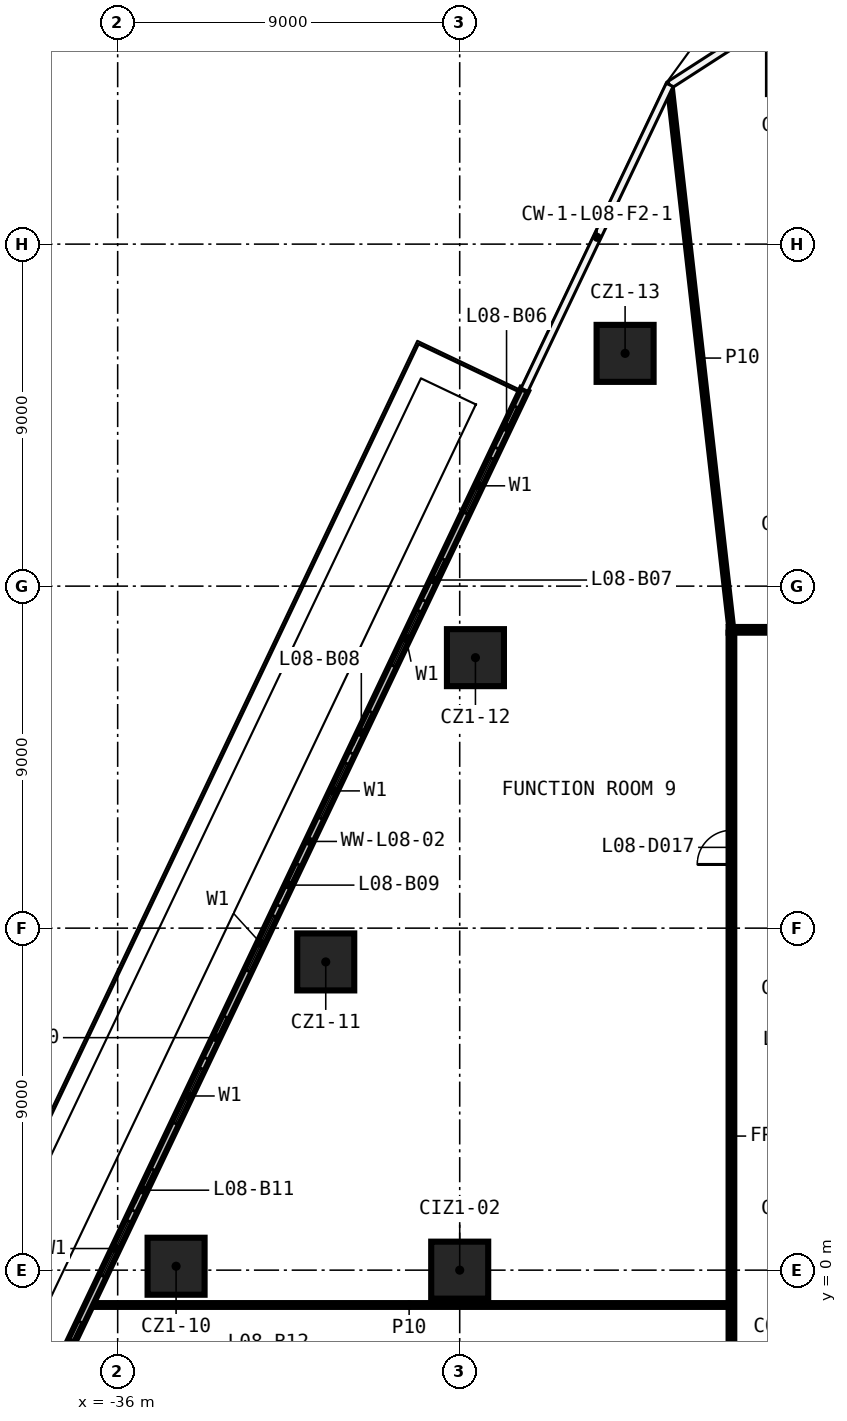
"""IFC4 building model, lengths in metres.
Left out: names, types, materials, properties, quantities, classifications, styles, units other than length and angle.
Written with IfcOpenShell. Run it as: python <this file> out.ifc"""

import sys

from ifc_helpers import new_model, si_unit, direction, frame, frame_2d, origin, origin_2d, place, context, subcontext, project, spatial, rectangle, extrude, element, fill, save


model = new_model("IFC4")
c1 = context("Model", 3, precision=1e-05, world=origin(), true_north=direction((0.0, 1.0)))
c2 = subcontext(c1, "Body", "Model", "MODEL_VIEW")
j1 = project(units=[si_unit("LENGTHUNIT", "METRE"), si_unit("PLANEANGLEUNIT", "RADIAN")], contexts=[c1])
p1 = place(None, origin())
s1 = spatial("IfcSite", under=j1, at=p1, CompositionType="ELEMENT")
p2 = place(p1, origin())
s2 = spatial("IfcBuilding", under=s1, at=p2, CompositionType="ELEMENT")
p3 = place(p2, frame((0.0, 0.0, 51.4)))
s3 = spatial("IfcBuildingStorey", under=s2, at=p3, CompositionType="ELEMENT", Elevation=51.4)
for number, where, z_axis, x_axis in (
    (1, (-34.463, 0.103, 0.0), (0.0, 0.0, 1.0), (1.0, 0.0, 0.0)),
    (2, (-30.525, 8.111, 0.0), (0.0, 0.0, 1.0), (1.0, 0.0, 0.0)),
    (3, (-26.586, 16.118, 0.0), (0.0, 0.0, 1.0), (1.0, 0.0, 0.0)),
    (4, (-22.648, 24.125, 0.0), (0.0, 0.0, 1.0), (1.0, 0.0, 0.0)),
    (5, (-27.0, 0.0, 0.0), (0.0, 0.0, 1.0), (1.0, 0.0, 0.0)),
):
    element("IfcColumn", number, at=place(p3, frame(where, z_axis=z_axis, x_axis=x_axis)), inside=s3, PredefinedType="COLUMN", context=c2, shape_type="SweptSolid", body=[
        extrude(rectangle(XDim=1.5, YDim=1.5, at=origin_2d()), origin(), (0.0, 0.0, 1.0), 3.3),
    ])
p4 = place(p3, frame((-36.737, -0.917, 0.0), z_axis=(0.0, 0.0, 1.0), x_axis=(1.0, 0.0, 0.0)))
e6 = element("IfcWall", 6, at=p4, inside=s3, PredefinedType="PARTITIONING", context=c2, shape_type="SweptSolid", body=[
    extrude(rectangle(XDim=16.812, YDim=0.1, at=frame_2d((8.406, 0.0))), origin(), (0.0, 0.0, 1.0), 3.3),
])
p5 = place(p3, frame((-19.925, 16.85, 0.0), z_axis=(0.0, 0.0, 1.0), x_axis=(1.0, 0.0, 0.0)))
e7 = element("IfcWall", 7, at=p5, inside=s3, PredefinedType="PARTITIONING", context=c2, shape_type="SweptSolid", body=[
    extrude(rectangle(XDim=39.85, YDim=0.15, at=frame_2d((19.925, 0.0))), origin(), (0.0, 0.0, 1.0), 3.3),
])
p6 = place(p5, frame((31.643, 0.0, 0.0)))
e8 = element("IfcOpeningElement", 8, at=p6, cuts=e7, PredefinedType="OPENING", context=c2, shape_type="SweptSolid", body=[
    extrude(rectangle(XDim=0.9, YDim=2.1, at=frame_2d((0.45, 1.05))), frame((0.0, 0.085, 0.0), z_axis=(0.0, -1.0, 0.0), x_axis=(1.0, 0.0, 0.0)), (0.0, 0.0, 1.0), 0.17),
])
p7 = place(p5, frame((22.056, 0.0, 0.0)))
e9 = element("IfcOpeningElement", 9, at=p7, cuts=e7, PredefinedType="OPENING", context=c2, shape_type="SweptSolid", body=[
    extrude(rectangle(XDim=0.9, YDim=2.1, at=frame_2d((0.45, 1.05))), frame((0.0, 0.085, 0.0), z_axis=(0.0, -1.0, 0.0), x_axis=(1.0, 0.0, 0.0)), (0.0, 0.0, 1.0), 0.17),
])
p8 = place(p5, frame((14.831, 0.0, 0.0)))
e10 = element("IfcOpeningElement", 10, at=p8, cuts=e7, PredefinedType="OPENING", context=c2, shape_type="SweptSolid", body=[
    extrude(rectangle(XDim=1.0, YDim=2.1, at=frame_2d((0.5, 1.05))), frame((0.0, 0.085, 0.0), z_axis=(0.0, -1.0, 0.0), x_axis=(1.0, 0.0, 0.0)), (0.0, 0.0, 1.0), 0.17),
])
p9 = place(p3, frame((-19.85, -16.775, 0.0), z_axis=(0.0, 0.0, 1.0), x_axis=(0.0, 1.0, 0.0)))
e11 = element("IfcWall", 11, at=p9, inside=s3, PredefinedType="PARTITIONING", context=c2, shape_type="SweptSolid", body=[
    extrude(rectangle(XDim=33.55, YDim=0.15, at=frame_2d((16.775, 0.0))), origin(), (0.0, 0.0, 1.0), 3.3),
])
p10 = place(p9, frame((12.256, 0.0, 0.0)))
e12 = element("IfcOpeningElement", 12, at=p10, cuts=e11, PredefinedType="OPENING", context=c2, shape_type="SweptSolid", body=[
    extrude(rectangle(XDim=0.9, YDim=2.1, at=frame_2d((0.45, 1.05))), frame((0.0, 0.085, 0.0), z_axis=(0.0, -1.0, 0.0), x_axis=(1.0, 0.0, 0.0)), (0.0, 0.0, 1.0), 0.17),
])
p11 = place(p9, frame((3.254, 0.0, 0.0)))
e13 = element("IfcOpeningElement", 13, at=p11, cuts=e11, PredefinedType="OPENING", context=c2, shape_type="SweptSolid", body=[
    extrude(rectangle(XDim=0.9, YDim=2.1, at=frame_2d((0.45, 1.05))), frame((0.0, 0.085, 0.0), z_axis=(0.0, -1.0, 0.0), x_axis=(1.0, 0.0, 0.0)), (0.0, 0.0, 1.0), 0.17),
])
p12 = place(p9, frame((27.451, 0.0, 0.0)))
e14 = element("IfcOpeningElement", 14, at=p12, cuts=e11, PredefinedType="OPENING", context=c2, shape_type="SweptSolid", body=[
    extrude(rectangle(XDim=0.9, YDim=2.1, at=frame_2d((0.45, 1.05))), frame((0.0, 0.085, 0.0), z_axis=(0.0, -1.0, 0.0), x_axis=(1.0, 0.0, 0.0)), (0.0, 0.0, 1.0), 0.17),
])
p13 = place(p3, frame((-21.472, 31.153, 0.0), z_axis=(0.0, 0.0, 1.0), x_axis=(0.112685540228, -0.993630700524, 0.0)))
e15 = element("IfcWall", 15, at=p13, inside=s3, PredefinedType="PARTITIONING", context=c2, shape_type="SweptSolid", body=[
    extrude(rectangle(XDim=14.395, YDim=0.1, at=frame_2d((7.197, 0.0))), origin(), (0.0, 0.0, 1.0), 3.3),
])
p14 = place(p3, frame((-25.295, 23.168, 0.0), z_axis=(0.0, 0.0, 1.0), x_axis=(-0.429791665344, -0.902928083737, 0.0)))
e16 = element("IfcWall", 16, at=p14, inside=s3, PredefinedType="SOLIDWALL", context=c2, shape_type="SweptSolid", body=[
    extrude(rectangle(XDim=31.12, YDim=0.2, at=frame_2d((15.56, 0.0))), origin(), (0.0, 0.0, 1.0), 3.3),
])
p15 = place(p14, frame((2.0, 0.0, 0.6)))
e17 = element("IfcOpeningElement", 17, at=p15, cuts=e16, PredefinedType="OPENING", context=c2, shape_type="SweptSolid", body=[
    extrude(rectangle(XDim=1.6, YDim=2.4, at=frame_2d((0.8, 1.2))), frame((0.0, 0.11, 0.0), z_axis=(0.0, -1.0, 0.0), x_axis=(1.0, 0.0, 0.0)), (0.0, 0.0, 1.0), 0.22),
])
p16 = place(p14, frame((0.5, 0.0, 0.0)))
e18 = element("IfcOpeningElement", 18, at=p16, cuts=e16, PredefinedType="OPENING", context=c2, shape_type="SweptSolid", body=[
    extrude(rectangle(XDim=1.2, YDim=2.4, at=frame_2d((0.6, 1.2))), frame((0.0, 0.11, 0.0), z_axis=(0.0, -1.0, 0.0), x_axis=(1.0, 0.0, 0.0)), (0.0, 0.0, 1.0), 0.22),
])
p17 = place(p14, frame((6.446, 0.0, 0.6)))
e19 = element("IfcOpeningElement", 19, at=p17, cuts=e16, PredefinedType="OPENING", context=c2, shape_type="SweptSolid", body=[
    extrude(rectangle(XDim=1.6, YDim=2.4, at=frame_2d((0.8, 1.2))), frame((0.0, 0.11, 0.0), z_axis=(0.0, -1.0, 0.0), x_axis=(1.0, 0.0, 0.0)), (0.0, 0.0, 1.0), 0.22),
])
p18 = place(p14, frame((4.946, 0.0, 0.0)))
e20 = element("IfcOpeningElement", 20, at=p18, cuts=e16, PredefinedType="OPENING", context=c2, shape_type="SweptSolid", body=[
    extrude(rectangle(XDim=1.2, YDim=2.4, at=frame_2d((0.6, 1.2))), frame((0.0, 0.11, 0.0), z_axis=(0.0, -1.0, 0.0), x_axis=(1.0, 0.0, 0.0)), (0.0, 0.0, 1.0), 0.22),
])
p19 = place(p14, frame((10.891, 0.0, 0.6)))
e21 = element("IfcOpeningElement", 21, at=p19, cuts=e16, PredefinedType="OPENING", context=c2, shape_type="SweptSolid", body=[
    extrude(rectangle(XDim=1.6, YDim=2.4, at=frame_2d((0.8, 1.2))), frame((0.0, 0.11, 0.0), z_axis=(0.0, -1.0, 0.0), x_axis=(1.0, 0.0, 0.0)), (0.0, 0.0, 1.0), 0.22),
])
p20 = place(p14, frame((9.391, 0.0, 0.0)))
e22 = element("IfcOpeningElement", 22, at=p20, cuts=e16, PredefinedType="OPENING", context=c2, shape_type="SweptSolid", body=[
    extrude(rectangle(XDim=1.2, YDim=2.4, at=frame_2d((0.6, 1.2))), frame((0.0, 0.11, 0.0), z_axis=(0.0, -1.0, 0.0), x_axis=(1.0, 0.0, 0.0)), (0.0, 0.0, 1.0), 0.22),
])
p21 = place(p14, frame((15.337, 0.0, 0.6)))
e23 = element("IfcOpeningElement", 23, at=p21, cuts=e16, PredefinedType="OPENING", context=c2, shape_type="SweptSolid", body=[
    extrude(rectangle(XDim=1.6, YDim=2.4, at=frame_2d((0.8, 1.2))), frame((0.0, 0.11, 0.0), z_axis=(0.0, -1.0, 0.0), x_axis=(1.0, 0.0, 0.0)), (0.0, 0.0, 1.0), 0.22),
])
p22 = place(p14, frame((13.837, 0.0, 0.0)))
e24 = element("IfcOpeningElement", 24, at=p22, cuts=e16, PredefinedType="OPENING", context=c2, shape_type="SweptSolid", body=[
    extrude(rectangle(XDim=1.2, YDim=2.4, at=frame_2d((0.6, 1.2))), frame((0.0, 0.11, 0.0), z_axis=(0.0, -1.0, 0.0), x_axis=(1.0, 0.0, 0.0)), (0.0, 0.0, 1.0), 0.22),
])
p23 = place(p14, frame((19.783, 0.0, 0.6)))
e25 = element("IfcOpeningElement", 25, at=p23, cuts=e16, PredefinedType="OPENING", context=c2, shape_type="SweptSolid", body=[
    extrude(rectangle(XDim=1.6, YDim=2.4, at=frame_2d((0.8, 1.2))), frame((0.0, 0.11, 0.0), z_axis=(0.0, -1.0, 0.0), x_axis=(1.0, 0.0, 0.0)), (0.0, 0.0, 1.0), 0.22),
])
p24 = place(p14, frame((18.283, 0.0, 0.0)))
e26 = element("IfcOpeningElement", 26, at=p24, cuts=e16, PredefinedType="OPENING", context=c2, shape_type="SweptSolid", body=[
    extrude(rectangle(XDim=1.2, YDim=2.4, at=frame_2d((0.6, 1.2))), frame((0.0, 0.11, 0.0), z_axis=(0.0, -1.0, 0.0), x_axis=(1.0, 0.0, 0.0)), (0.0, 0.0, 1.0), 0.22),
])
p25 = place(p14, frame((24.229, 0.0, 0.6)))
e27 = element("IfcOpeningElement", 27, at=p25, cuts=e16, PredefinedType="OPENING", context=c2, shape_type="SweptSolid", body=[
    extrude(rectangle(XDim=1.6, YDim=2.4, at=frame_2d((0.8, 1.2))), frame((0.0, 0.11, 0.0), z_axis=(0.0, -1.0, 0.0), x_axis=(1.0, 0.0, 0.0)), (0.0, 0.0, 1.0), 0.22),
])
p26 = place(p14, frame((22.729, 0.0, 0.0)))
e28 = element("IfcOpeningElement", 28, at=p26, cuts=e16, PredefinedType="OPENING", context=c2, shape_type="SweptSolid", body=[
    extrude(rectangle(XDim=1.2, YDim=2.4, at=frame_2d((0.6, 1.2))), frame((0.0, 0.11, 0.0), z_axis=(0.0, -1.0, 0.0), x_axis=(1.0, 0.0, 0.0)), (0.0, 0.0, 1.0), 0.22),
])
p27 = place(p14, frame((28.674, 0.0, 0.6)))
e29 = element("IfcOpeningElement", 29, at=p27, cuts=e16, PredefinedType="OPENING", context=c2, shape_type="SweptSolid", body=[
    extrude(rectangle(XDim=1.6, YDim=2.4, at=frame_2d((0.8, 1.2))), frame((0.0, 0.11, 0.0), z_axis=(0.0, -1.0, 0.0), x_axis=(1.0, 0.0, 0.0)), (0.0, 0.0, 1.0), 0.22),
])
p28 = place(p14, frame((27.174, 0.0, 0.0)))
e30 = element("IfcOpeningElement", 30, at=p28, cuts=e16, PredefinedType="OPENING", context=c2, shape_type="SweptSolid", body=[
    extrude(rectangle(XDim=1.2, YDim=2.4, at=frame_2d((0.6, 1.2))), frame((0.0, 0.11, 0.0), z_axis=(0.0, -1.0, 0.0), x_axis=(1.0, 0.0, 0.0)), (0.0, 0.0, 1.0), 0.22),
])
p29 = place(p12, origin())
e31 = element("IfcDoor", 31, at=p29, inside=s3, OperationType="SINGLE_SWING_LEFT", PredefinedType="DOOR", context=c2, shape_type="SweptSolid", body=[
    extrude(rectangle(XDim=0.9, YDim=2.1, at=frame_2d((0.45, 1.05))), frame((0.0, 0.025, 0.0), z_axis=(0.0, -1.0, 0.0), x_axis=(1.0, 0.0, 0.0)), (0.0, 0.0, 1.0), 0.05),
])
fill(e14, e31)
p30 = place(p15, origin())
e32 = element("IfcWindow", 32, at=p30, inside=s3, PartitioningType="SINGLE_PANEL", PredefinedType="WINDOW", context=c2, shape_type="SweptSolid", body=[
    extrude(rectangle(XDim=1.6, YDim=2.4, at=frame_2d((0.8, 1.2))), frame((0.0, 0.03, 0.0), z_axis=(0.0, -1.0, 0.0), x_axis=(1.0, 0.0, 0.0)), (0.0, 0.0, 1.0), 0.06),
])
fill(e17, e32)
p31 = place(p16, origin())
e33 = element("IfcDoor", 33, at=p31, inside=s3, OperationType="SLIDING_TO_LEFT", PredefinedType="DOOR", context=c2, shape_type="SweptSolid", body=[
    extrude(rectangle(XDim=1.2, YDim=2.4, at=frame_2d((0.6, 1.2))), frame((0.0, 0.025, 0.0), z_axis=(0.0, -1.0, 0.0), x_axis=(1.0, 0.0, 0.0)), (0.0, 0.0, 1.0), 0.05),
])
fill(e18, e33)
p32 = place(p17, origin())
e34 = element("IfcWindow", 34, at=p32, inside=s3, PartitioningType="SINGLE_PANEL", PredefinedType="WINDOW", context=c2, shape_type="SweptSolid", body=[
    extrude(rectangle(XDim=1.6, YDim=2.4, at=frame_2d((0.8, 1.2))), frame((0.0, 0.03, 0.0), z_axis=(0.0, -1.0, 0.0), x_axis=(1.0, 0.0, 0.0)), (0.0, 0.0, 1.0), 0.06),
])
fill(e19, e34)
p33 = place(p18, origin())
e35 = element("IfcDoor", 35, at=p33, inside=s3, OperationType="SLIDING_TO_LEFT", PredefinedType="DOOR", context=c2, shape_type="SweptSolid", body=[
    extrude(rectangle(XDim=1.2, YDim=2.4, at=frame_2d((0.6, 1.2))), frame((0.0, 0.025, 0.0), z_axis=(0.0, -1.0, 0.0), x_axis=(1.0, 0.0, 0.0)), (0.0, 0.0, 1.0), 0.05),
])
fill(e20, e35)
p34 = place(p19, origin())
e36 = element("IfcWindow", 36, at=p34, inside=s3, PartitioningType="SINGLE_PANEL", PredefinedType="WINDOW", context=c2, shape_type="SweptSolid", body=[
    extrude(rectangle(XDim=1.6, YDim=2.4, at=frame_2d((0.8, 1.2))), frame((0.0, 0.03, 0.0), z_axis=(0.0, -1.0, 0.0), x_axis=(1.0, 0.0, 0.0)), (0.0, 0.0, 1.0), 0.06),
])
fill(e21, e36)
p35 = place(p20, origin())
e37 = element("IfcDoor", 37, at=p35, inside=s3, OperationType="SLIDING_TO_LEFT", PredefinedType="DOOR", context=c2, shape_type="SweptSolid", body=[
    extrude(rectangle(XDim=1.2, YDim=2.4, at=frame_2d((0.6, 1.2))), frame((0.0, 0.025, 0.0), z_axis=(0.0, -1.0, 0.0), x_axis=(1.0, 0.0, 0.0)), (0.0, 0.0, 1.0), 0.05),
])
fill(e22, e37)
p36 = place(p21, origin())
e38 = element("IfcWindow", 38, at=p36, inside=s3, PartitioningType="SINGLE_PANEL", PredefinedType="WINDOW", context=c2, shape_type="SweptSolid", body=[
    extrude(rectangle(XDim=1.6, YDim=2.4, at=frame_2d((0.8, 1.2))), frame((0.0, 0.03, 0.0), z_axis=(0.0, -1.0, 0.0), x_axis=(1.0, 0.0, 0.0)), (0.0, 0.0, 1.0), 0.06),
])
fill(e23, e38)
p37 = place(p22, origin())
e39 = element("IfcDoor", 39, at=p37, inside=s3, OperationType="SLIDING_TO_LEFT", PredefinedType="DOOR", context=c2, shape_type="SweptSolid", body=[
    extrude(rectangle(XDim=1.2, YDim=2.4, at=frame_2d((0.6, 1.2))), frame((0.0, 0.025, 0.0), z_axis=(0.0, -1.0, 0.0), x_axis=(1.0, 0.0, 0.0)), (0.0, 0.0, 1.0), 0.05),
])
fill(e24, e39)
p38 = place(p23, origin())
e40 = element("IfcWindow", 40, at=p38, inside=s3, PartitioningType="SINGLE_PANEL", PredefinedType="WINDOW", context=c2, shape_type="SweptSolid", body=[
    extrude(rectangle(XDim=1.6, YDim=2.4, at=frame_2d((0.8, 1.2))), frame((0.0, 0.03, 0.0), z_axis=(0.0, -1.0, 0.0), x_axis=(1.0, 0.0, 0.0)), (0.0, 0.0, 1.0), 0.06),
])
fill(e25, e40)
p39 = place(p24, origin())
e41 = element("IfcDoor", 41, at=p39, inside=s3, OperationType="SLIDING_TO_LEFT", PredefinedType="DOOR", context=c2, shape_type="SweptSolid", body=[
    extrude(rectangle(XDim=1.2, YDim=2.4, at=frame_2d((0.6, 1.2))), frame((0.0, 0.025, 0.0), z_axis=(0.0, -1.0, 0.0), x_axis=(1.0, 0.0, 0.0)), (0.0, 0.0, 1.0), 0.05),
])
fill(e26, e41)
p40 = place(p25, origin())
e42 = element("IfcWindow", 42, at=p40, inside=s3, PartitioningType="SINGLE_PANEL", PredefinedType="WINDOW", context=c2, shape_type="SweptSolid", body=[
    extrude(rectangle(XDim=1.6, YDim=2.4, at=frame_2d((0.8, 1.2))), frame((0.0, 0.03, 0.0), z_axis=(0.0, -1.0, 0.0), x_axis=(1.0, 0.0, 0.0)), (0.0, 0.0, 1.0), 0.06),
])
fill(e27, e42)
p41 = place(p26, origin())
e43 = element("IfcDoor", 43, at=p41, inside=s3, OperationType="SLIDING_TO_LEFT", PredefinedType="DOOR", context=c2, shape_type="SweptSolid", body=[
    extrude(rectangle(XDim=1.2, YDim=2.4, at=frame_2d((0.6, 1.2))), frame((0.0, 0.025, 0.0), z_axis=(0.0, -1.0, 0.0), x_axis=(1.0, 0.0, 0.0)), (0.0, 0.0, 1.0), 0.05),
])
fill(e28, e43)
p42 = place(p28, origin())
e44 = element("IfcDoor", 44, at=p42, inside=s3, OperationType="SLIDING_TO_LEFT", PredefinedType="DOOR", context=c2, shape_type="SweptSolid", body=[
    extrude(rectangle(XDim=1.2, YDim=2.4, at=frame_2d((0.6, 1.2))), frame((0.0, 0.025, 0.0), z_axis=(0.0, -1.0, 0.0), x_axis=(1.0, 0.0, 0.0)), (0.0, 0.0, 1.0), 0.05),
])
fill(e30, e44)
save(model, sys.argv[1])
